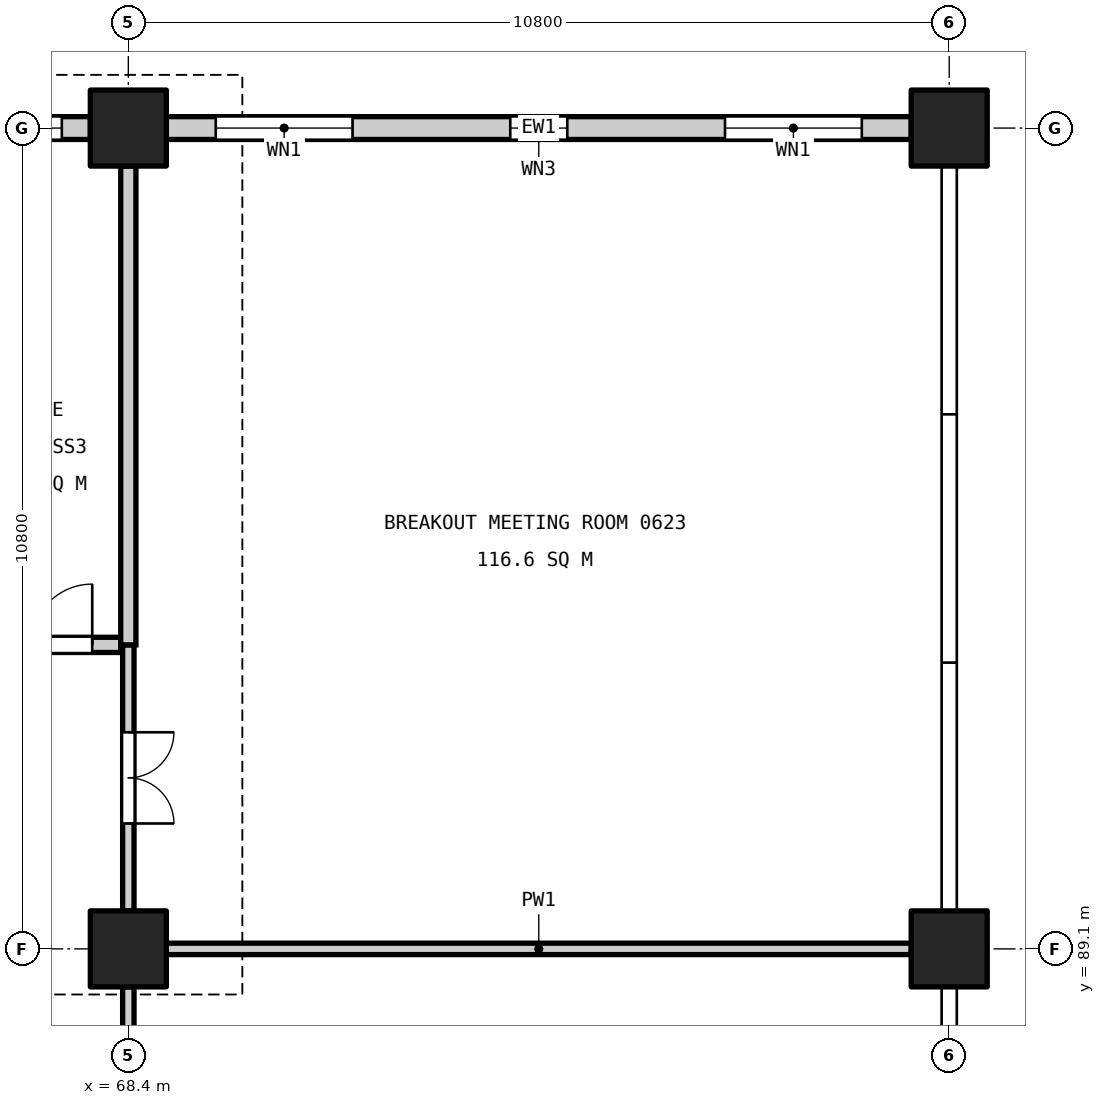
"""IFC4 building model, lengths in metres.
Left out: names, types, materials, properties, quantities, classifications, styles, units other than length and angle.
Written with IfcOpenShell. Run it as: python <this file> out.ifc"""

import sys

from ifc_helpers import new_model, si_unit, direction, frame, frame_2d, origin, origin_2d, place, context, subcontext, project, spatial, rectangle, extrude, element, fill, save


model = new_model("IFC4")
c1 = context("Model", 3, precision=1e-05, world=origin(), true_north=direction((0.0, 1.0)))
c2 = subcontext(c1, "Body", "Model", "MODEL_VIEW")
j1 = project(units=[si_unit("LENGTHUNIT", "METRE"), si_unit("PLANEANGLEUNIT", "RADIAN")], contexts=[c1])
p1 = place(None, origin())
s1 = spatial("IfcSite", under=j1, at=p1, CompositionType="ELEMENT")
p2 = place(p1, origin())
s2 = spatial("IfcBuilding", under=s1, at=p2, CompositionType="ELEMENT")
p3 = place(p2, frame((0.0, 0.0, 31.8)))
s3 = spatial("IfcBuildingStorey", under=s2, at=p3, CompositionType="ELEMENT", Elevation=31.8)
for number, where, z_axis, x_axis in (
    (1, (68.4, 89.1, 0.0), (0.0, 0.0, 1.0), (1.0, 0.0, 0.0)),
    (2, (68.4, 99.9, 0.0), (0.0, 0.0, 1.0), (1.0, 0.0, 0.0)),
    (3, (79.2, 89.1, 0.0), (0.0, 0.0, 1.0), (1.0, 0.0, 0.0)),
    (4, (79.2, 99.9, 0.0), (0.0, 0.0, 1.0), (1.0, 0.0, 0.0)),
):
    element("IfcColumn", number, at=place(p3, frame(where, z_axis=z_axis, x_axis=x_axis)), inside=s3, PredefinedType="COLUMN", context=c2, shape_type="SweptSolid", body=[
        extrude(rectangle(XDim=1.0, YDim=1.0, at=origin_2d()), origin(), (0.0, 0.0, 1.0), 4.8),
    ])
p4 = place(p3, frame((65.95, 99.9, 0.0), z_axis=(0.0, 0.0, 1.0), x_axis=(1.0, 0.0, 0.0)))
e5 = element("IfcWall", 5, at=p4, inside=s3, PredefinedType="STANDARD", context=c2, shape_type="SweptSolid", body=[
    extrude(rectangle(XDim=1.95, YDim=0.3, at=frame_2d((0.975, 0.0))), origin(), (0.0, 0.0, 1.0), 3.85),
])
p5 = place(p4, frame((0.375, 0.0, 0.9)))
e6 = element("IfcOpeningElement", 6, at=p5, cuts=e5, PredefinedType="OPENING", context=c2, shape_type="SweptSolid", body=[
    extrude(rectangle(XDim=1.2, YDim=2.4, at=frame_2d((0.6, 1.2))), frame((0.0, 0.16, 0.0), z_axis=(0.0, -1.0, 0.0), x_axis=(1.0, 0.0, 0.0)), (0.0, 0.0, 1.0), 0.32),
])
p6 = place(p3, frame((68.9, 99.9, 0.0), z_axis=(0.0, 0.0, 1.0), x_axis=(1.0, 0.0, 0.0)))
e7 = element("IfcWall", 7, at=p6, inside=s3, PredefinedType="STANDARD", context=c2, shape_type="SweptSolid", body=[
    extrude(rectangle(XDim=9.8, YDim=0.3, at=frame_2d((4.9, 0.0))), origin(), (0.0, 0.0, 1.0), 3.85),
])
p7 = place(p6, frame((0.65, 0.0, 0.9)))
e8 = element("IfcOpeningElement", 8, at=p7, cuts=e7, PredefinedType="OPENING", context=c2, shape_type="SweptSolid", body=[
    extrude(rectangle(XDim=1.8, YDim=2.4, at=frame_2d((0.9, 1.2))), frame((0.0, 0.16, 0.0), z_axis=(0.0, -1.0, 0.0), x_axis=(1.0, 0.0, 0.0)), (0.0, 0.0, 1.0), 0.32),
])
p8 = place(p6, frame((4.525, 0.0, 0.8)))
e9 = element("IfcOpeningElement", 9, at=p8, cuts=e7, PredefinedType="OPENING", context=c2, shape_type="SweptSolid", body=[
    extrude(rectangle(XDim=0.75, YDim=1.2, at=frame_2d((0.375, 0.6))), frame((0.0, 0.16, 0.0), z_axis=(0.0, -1.0, 0.0), x_axis=(1.0, 0.0, 0.0)), (0.0, 0.0, 1.0), 0.32),
])
p9 = place(p6, frame((7.35, 0.0, 0.9)))
e10 = element("IfcOpeningElement", 10, at=p9, cuts=e7, PredefinedType="OPENING", context=c2, shape_type="SweptSolid", body=[
    extrude(rectangle(XDim=1.8, YDim=2.4, at=frame_2d((0.9, 1.2))), frame((0.0, 0.16, 0.0), z_axis=(0.0, -1.0, 0.0), x_axis=(1.0, 0.0, 0.0)), (0.0, 0.0, 1.0), 0.32),
])
p10 = place(p3, frame((65.95, 93.1, 0.0), z_axis=(0.0, 0.0, 1.0), x_axis=(1.0, 0.0, 0.0)))
e11 = element("IfcWall", 11, at=p10, inside=s3, PredefinedType="PARTITIONING", context=c2, shape_type="SweptSolid", body=[
    extrude(rectangle(XDim=2.35, YDim=0.2, at=frame_2d((1.175, 0.0))), origin(), (0.0, 0.0, 1.0), 3.55),
])
p11 = place(p10, frame((0.375, 0.0, 0.0)))
e12 = element("IfcOpeningElement", 12, at=p11, cuts=e11, PredefinedType="OPENING", context=c2, shape_type="SweptSolid", body=[
    extrude(rectangle(XDim=1.6, YDim=2.1, at=frame_2d((0.8, 1.05))), frame((0.0, 0.11, 0.0), z_axis=(0.0, -1.0, 0.0), x_axis=(1.0, 0.0, 0.0)), (0.0, 0.0, 1.0), 0.22),
])
p12 = place(p3, frame((68.4, 78.8, 0.0), z_axis=(0.0, 0.0, 1.0), x_axis=(0.0, 1.0, 0.0)))
e13 = element("IfcWall", 13, at=p12, inside=s3, PredefinedType="PARTITIONING", context=c2, shape_type="SweptSolid", body=[
    extrude(rectangle(XDim=9.8, YDim=0.15, at=frame_2d((4.9, 0.0))), origin(), (0.0, 0.0, 1.0), 3.55),
])
p13 = place(p12, frame((4.3, 0.0, 0.0)))
e14 = element("IfcOpeningElement", 14, at=p13, cuts=e13, PredefinedType="OPENING", context=c2, shape_type="SweptSolid", body=[
    extrude(rectangle(XDim=1.2, YDim=2.1, at=frame_2d((0.6, 1.05))), frame((0.0, 0.085, 0.0), z_axis=(0.0, -1.0, 0.0), x_axis=(1.0, 0.0, 0.0)), (0.0, 0.0, 1.0), 0.17),
])
p14 = place(p12, frame((0.95, 0.0, 0.0)))
e15 = element("IfcOpeningElement", 15, at=p14, cuts=e13, PredefinedType="OPENING", context=c2, shape_type="SweptSolid", body=[
    extrude(rectangle(XDim=1.2, YDim=2.1, at=frame_2d((0.6, 1.05))), frame((0.0, 0.085, 0.0), z_axis=(0.0, -1.0, 0.0), x_axis=(1.0, 0.0, 0.0)), (0.0, 0.0, 1.0), 0.17),
])
p15 = place(p12, frame((7.65, 0.0, 0.0)))
e16 = element("IfcOpeningElement", 16, at=p15, cuts=e13, PredefinedType="OPENING", context=c2, shape_type="SweptSolid", body=[
    extrude(rectangle(XDim=1.2, YDim=2.1, at=frame_2d((0.6, 1.05))), frame((0.0, 0.085, 0.0), z_axis=(0.0, -1.0, 0.0), x_axis=(1.0, 0.0, 0.0)), (0.0, 0.0, 1.0), 0.17),
])
p16 = place(p3, frame((68.4, 89.6, 0.0), z_axis=(0.0, 0.0, 1.0), x_axis=(0.0, 1.0, 0.0)))
e17 = element("IfcWall", 17, at=p16, inside=s3, PredefinedType="PARTITIONING", context=c2, shape_type="SweptSolid", body=[
    extrude(rectangle(XDim=3.5, YDim=0.15, at=frame_2d((1.75, 0.0))), origin(), (0.0, 0.0, 1.0), 3.55),
])
p17 = place(p16, frame((1.15, 0.0, 0.0)))
e18 = element("IfcOpeningElement", 18, at=p17, cuts=e17, PredefinedType="OPENING", context=c2, shape_type="SweptSolid", body=[
    extrude(rectangle(XDim=1.2, YDim=2.1, at=frame_2d((0.6, 1.05))), frame((0.0, 0.085, 0.0), z_axis=(0.0, -1.0, 0.0), x_axis=(1.0, 0.0, 0.0)), (0.0, 0.0, 1.0), 0.17),
])
p18 = place(p3, frame((68.4, 93.1, 0.0), z_axis=(0.0, 0.0, 1.0), x_axis=(0.0, 1.0, 0.0)))
e19 = element("IfcWall", 19, at=p18, inside=s3, PredefinedType="PARTITIONING", context=c2, shape_type="SweptSolid", body=[
    extrude(rectangle(XDim=6.3, YDim=0.2, at=frame_2d((3.15, 0.0))), origin(), (0.0, 0.0, 1.0), 3.55),
])
p19 = place(p3, frame((68.9, 89.1, 0.0), z_axis=(0.0, 0.0, 1.0), x_axis=(1.0, 0.0, 0.0)))
e20 = element("IfcWall", 20, at=p19, inside=s3, PredefinedType="PARTITIONING", context=c2, shape_type="SweptSolid", body=[
    extrude(rectangle(XDim=9.8, YDim=0.15, at=frame_2d((4.9, 0.0))), origin(), (0.0, 0.0, 1.0), 3.85),
])
p20 = place(p5, origin())
e21 = element("IfcWindow", 21, at=p20, inside=s3, PartitioningType="SINGLE_PANEL", PredefinedType="WINDOW", context=c2, shape_type="SweptSolid", body=[
    extrude(rectangle(XDim=1.2, YDim=2.4, at=frame_2d((0.6, 1.2))), frame((0.0, 0.03, 0.0), z_axis=(0.0, -1.0, 0.0), x_axis=(1.0, 0.0, 0.0)), (0.0, 0.0, 1.0), 0.06),
])
fill(e6, e21)
p21 = place(p7, origin())
e22 = element("IfcWindow", 22, at=p21, inside=s3, PartitioningType="SINGLE_PANEL", PredefinedType="WINDOW", context=c2, shape_type="SweptSolid", body=[
    extrude(rectangle(XDim=1.8, YDim=2.4, at=frame_2d((0.9, 1.2))), frame((0.0, 0.03, 0.0), z_axis=(0.0, -1.0, 0.0), x_axis=(1.0, 0.0, 0.0)), (0.0, 0.0, 1.0), 0.06),
])
fill(e8, e22)
p22 = place(p8, origin())
e23 = element("IfcWindow", 23, at=p22, inside=s3, PartitioningType="SINGLE_PANEL", PredefinedType="WINDOW", context=c2, shape_type="SweptSolid", body=[
    extrude(rectangle(XDim=0.75, YDim=1.2, at=frame_2d((0.375, 0.6))), frame((0.0, 0.03, 0.0), z_axis=(0.0, -1.0, 0.0), x_axis=(1.0, 0.0, 0.0)), (0.0, 0.0, 1.0), 0.06),
])
fill(e9, e23)
p23 = place(p9, origin())
e24 = element("IfcWindow", 24, at=p23, inside=s3, PartitioningType="SINGLE_PANEL", PredefinedType="WINDOW", context=c2, shape_type="SweptSolid", body=[
    extrude(rectangle(XDim=1.8, YDim=2.4, at=frame_2d((0.9, 1.2))), frame((0.0, 0.03, 0.0), z_axis=(0.0, -1.0, 0.0), x_axis=(1.0, 0.0, 0.0)), (0.0, 0.0, 1.0), 0.06),
])
fill(e10, e24)
p24 = place(p17, frame((1.2, 0.0, 0.0), z_axis=(0.0, 0.0, 1.0), x_axis=(-1.0, 0.0, 0.0)))
e25 = element("IfcDoor", 25, at=p24, inside=s3, OperationType="DOUBLE_DOOR_SINGLE_SWING", PredefinedType="DOOR", context=c2, shape_type="SweptSolid", body=[
    extrude(rectangle(XDim=1.2, YDim=2.1, at=frame_2d((0.6, 1.05))), frame((0.0, 0.025, 0.0), z_axis=(0.0, -1.0, 0.0), x_axis=(1.0, 0.0, 0.0)), (0.0, 0.0, 1.0), 0.05),
])
fill(e18, e25)
p25 = place(p11, origin())
e26 = element("IfcDoor", 26, at=p25, inside=s3, OperationType="DOUBLE_DOOR_SINGLE_SWING", PredefinedType="DOOR", context=c2, shape_type="SweptSolid", body=[
    extrude(rectangle(XDim=1.6, YDim=2.1, at=frame_2d((0.8, 1.05))), frame((0.0, 0.025, 0.0), z_axis=(0.0, -1.0, 0.0), x_axis=(1.0, 0.0, 0.0)), (0.0, 0.0, 1.0), 0.05),
])
fill(e12, e26)
save(model, sys.argv[1])
